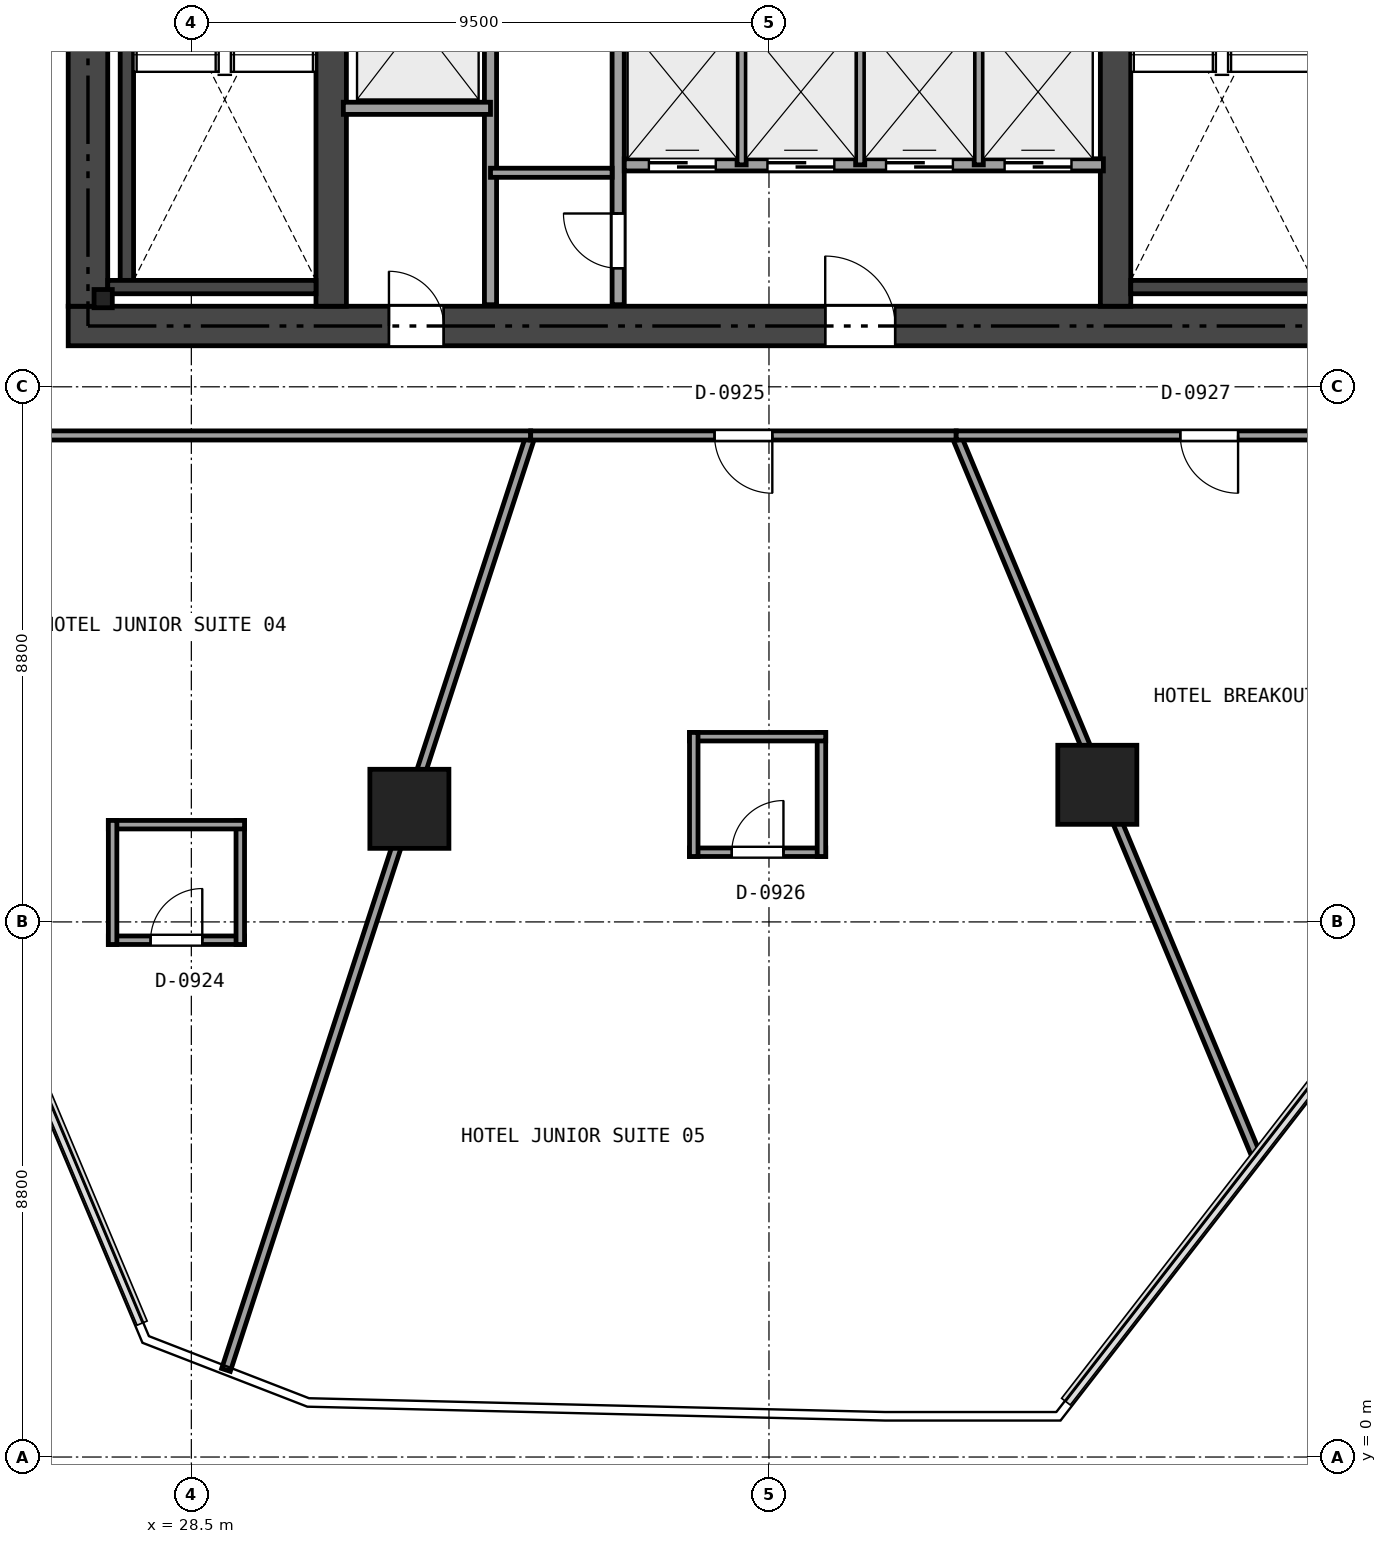
"""IFC4 building model, lengths in metres.
Left out: names, types, materials, properties, quantities, classifications, styles, units other than length and angle.
Written with IfcOpenShell. Run it as: python <this file> out.ifc"""

import sys

from ifc_helpers import new_model, si_unit, direction, frame, frame_2d, origin, origin_2d, place, context, subcontext, project, spatial, rectangle, i_section, extrude, element, fill, save


model = new_model("IFC4")
c1 = context("Model", 3, precision=1e-05, world=origin(), true_north=direction((0.0, 1.0)))
c2 = subcontext(c1, "Body", "Model", "MODEL_VIEW")
j1 = project(units=[si_unit("LENGTHUNIT", "METRE"), si_unit("PLANEANGLEUNIT", "RADIAN")], contexts=[c1])
p1 = place(None, origin())
s1 = spatial("IfcSite", under=j1, at=p1, CompositionType="ELEMENT")
p2 = place(p1, origin())
s2 = spatial("IfcBuilding", under=s1, at=p2, CompositionType="ELEMENT")
p3 = place(p2, frame((0.0, 0.0, 40.8)))
s3 = spatial("IfcBuildingStorey", under=s2, at=p3, CompositionType="ELEMENT", Elevation=40.8)
p4 = place(p3, frame((26.475, 18.6, 0.0), z_axis=(0.0, 0.0, 1.0), x_axis=(1.0, 0.0, 0.0)))
e1 = element("IfcWall", 1, at=p4, inside=s3, PredefinedType="SHEAR", context=c2, shape_type="SweptSolid", body=[
    extrude(rectangle(XDim=21.45, YDim=0.65, at=frame_2d((10.725, 0.0))), origin(), (0.0, 0.0, 1.0), 3.17),
])
p5 = place(p4, frame((12.45, 0.0, 0.0)))
e2 = element("IfcOpeningElement", 2, at=p5, cuts=e1, PredefinedType="OPENING", context=c2, shape_type="SweptSolid", body=[
    extrude(rectangle(XDim=1.15, YDim=2.15, at=frame_2d((0.575, 1.075))), frame((0.0, 0.335, 0.0), z_axis=(0.0, -1.0, 0.0), x_axis=(1.0, 0.0, 0.0)), (0.0, 0.0, 1.0), 0.67),
])
p6 = place(p4, frame((5.275, 0.0, 0.0)))
e3 = element("IfcOpeningElement", 3, at=p6, cuts=e1, PredefinedType="OPENING", context=c2, shape_type="SweptSolid", body=[
    extrude(rectangle(XDim=0.9, YDim=2.1, at=frame_2d((0.45, 1.05))), frame((0.0, 0.335, 0.0), z_axis=(0.0, -1.0, 0.0), x_axis=(1.0, 0.0, 0.0)), (0.0, 0.0, 1.0), 0.67),
])
p7 = place(p3, frame((26.8, 18.925, 0.0), z_axis=(0.0, 0.0, 1.0), x_axis=(0.0, 1.0, 0.0)))
e4 = element("IfcWall", 4, at=p7, inside=s3, PredefinedType="SHEAR", context=c2, shape_type="SweptSolid", body=[
    extrude(rectangle(XDim=14.95, YDim=0.65, at=frame_2d((7.475, 0.0))), origin(), (0.0, 0.0, 1.0), 3.17),
])
p8 = place(p3, frame((30.8, 18.925, 0.0), z_axis=(0.0, 0.0, 1.0), x_axis=(0.0, 1.0, 0.0)))
e5 = element("IfcWall", 5, at=p8, inside=s3, PredefinedType="SHEAR", context=c2, shape_type="SweptSolid", body=[
    extrude(rectangle(XDim=14.95, YDim=0.5, at=frame_2d((7.475, 0.0))), origin(), (0.0, 0.0, 1.0), 3.17),
])
p9 = place(p8, frame((6.575, 0.0, 0.0)))
e6 = element("IfcOpeningElement", 6, at=p9, cuts=e5, PredefinedType="OPENING", context=c2, shape_type="SweptSolid", body=[
    extrude(rectangle(XDim=1.1, YDim=2.15, at=frame_2d((0.55, 1.075))), frame((0.0, 0.26, 0.0), z_axis=(0.0, -1.0, 0.0), x_axis=(1.0, 0.0, 0.0)), (0.0, 0.0, 1.0), 0.52),
])
p10 = place(p8, frame((8.375, 0.0, 0.0)))
e7 = element("IfcOpeningElement", 7, at=p10, cuts=e5, PredefinedType="OPENING", context=c2, shape_type="SweptSolid", body=[
    extrude(rectangle(XDim=0.9, YDim=2.1, at=frame_2d((0.45, 1.05))), frame((0.0, 0.26, 0.0), z_axis=(0.0, -1.0, 0.0), x_axis=(1.0, 0.0, 0.0)), (0.0, 0.0, 1.0), 0.52),
])
p11 = place(p3, frame((43.7, 18.925, 0.0), z_axis=(0.0, 0.0, 1.0), x_axis=(0.0, 1.0, 0.0)))
e8 = element("IfcWall", 8, at=p11, inside=s3, PredefinedType="SHEAR", context=c2, shape_type="SweptSolid", body=[
    extrude(rectangle(XDim=14.95, YDim=0.5, at=frame_2d((7.475, 0.0))), origin(), (0.0, 0.0, 1.0), 3.17),
])
p12 = place(p11, frame((8.075, 0.0, 0.0)))
e9 = element("IfcOpeningElement", 9, at=p12, cuts=e8, PredefinedType="OPENING", context=c2, shape_type="SweptSolid", body=[
    extrude(rectangle(XDim=0.9, YDim=2.1, at=frame_2d((0.45, 1.05))), frame((0.0, 0.26, 0.0), z_axis=(0.0, -1.0, 0.0), x_axis=(1.0, 0.0, 0.0)), (0.0, 0.0, 1.0), 0.52),
])
p13 = place(p3, frame((27.44, 19.35, 0.0), z_axis=(0.0, 0.0, 1.0), x_axis=(0.0, 1.0, 0.0)))
e10 = element("IfcWall", 10, at=p13, inside=s3, PredefinedType="SHEAR", context=c2, shape_type="SweptSolid", body=[
    extrude(rectangle(XDim=7.4, YDim=0.22, at=frame_2d((3.7, 0.0))), origin(), (0.0, 0.0, 1.0), 3.17),
])
p14 = place(p3, frame((27.125, 19.24, 0.0), z_axis=(0.0, 0.0, 1.0), x_axis=(1.0, 0.0, 0.0)))
e11 = element("IfcWall", 11, at=p14, inside=s3, PredefinedType="SHEAR", context=c2, shape_type="SweptSolid", body=[
    extrude(rectangle(XDim=3.425, YDim=0.22, at=frame_2d((1.712, 0.0))), origin(), (0.0, 0.0, 1.0), 3.17),
])
p15 = place(p3, frame((43.95, 19.24, 0.0), z_axis=(0.0, 0.0, 1.0), x_axis=(1.0, 0.0, 0.0)))
e12 = element("IfcWall", 12, at=p15, inside=s3, PredefinedType="SHEAR", context=c2, shape_type="SweptSolid", body=[
    extrude(rectangle(XDim=3.325, YDim=0.22, at=frame_2d((1.663, 0.0))), origin(), (0.0, 0.0, 1.0), 3.17),
])
for number, where, z_axis, x_axis in (
    (13, (32.086, 10.66, 0.0), (0.0, 0.0, 1.0), (1.0, 0.0, 0.0)),
    (14, (43.4, 11.055, 0.0), (0.0, 0.0, 1.0), (1.0, 0.0, 0.0)),
):
    element("IfcColumn", number, at=place(p3, frame(where, z_axis=z_axis, x_axis=x_axis)), inside=s3, PredefinedType="COLUMN", context=c2, shape_type="SweptSolid", body=[
        extrude(rectangle(XDim=1.3, YDim=1.3, at=origin_2d()), origin(), (0.0, 0.0, 1.0), 3.17),
    ])
p16 = place(p3, frame((27.05, 19.05, 0.0), z_axis=(0.0, 0.0, 1.0), x_axis=(1.0, 0.0, 0.0)))
e15 = element("IfcColumn", 15, at=p16, inside=s3, PredefinedType="PILASTER", context=c2, shape_type="SweptSolid", body=[
    extrude(i_section(OverallWidth=0.3, OverallDepth=0.3, WebThickness=0.011, FlangeThickness=0.019, at=origin_2d()), origin(), (0.0, 0.0, 1.0), 3.17),
])
p17 = place(p3, frame((35.52, 18.95, 0.0), z_axis=(0.0, 0.0, 1.0), x_axis=(0.0, 1.0, 0.0)))
e16 = element("IfcWall", 16, at=p17, inside=s3, PredefinedType="SOLIDWALL", context=c2, shape_type="SweptSolid", body=[
    extrude(rectangle(XDim=14.9, YDim=0.2, at=frame_2d((7.45, 0.0))), origin(), (0.0, 0.0, 1.0), 2.691),
])
p18 = place(p17, frame((7.755, 0.0, 0.0)))
e17 = element("IfcOpeningElement", 17, at=p18, cuts=e16, PredefinedType="OPENING", context=c2, shape_type="SweptSolid", body=[
    extrude(rectangle(XDim=0.95, YDim=2.15, at=frame_2d((0.475, 1.075))), frame((0.0, 0.11, 0.0), z_axis=(0.0, -1.0, 0.0), x_axis=(1.0, 0.0, 0.0)), (0.0, 0.0, 1.0), 0.22),
])
p19 = place(p17, frame((0.6, 0.0, 0.0)))
e18 = element("IfcOpeningElement", 18, at=p19, cuts=e16, PredefinedType="OPENING", context=c2, shape_type="SweptSolid", body=[
    extrude(rectangle(XDim=0.9, YDim=2.1, at=frame_2d((0.45, 1.05))), frame((0.0, 0.11, 0.0), z_axis=(0.0, -1.0, 0.0), x_axis=(1.0, 0.0, 0.0)), (0.0, 0.0, 1.0), 0.22),
])
p20 = place(p3, frame((33.42, 18.95, 0.0), z_axis=(0.0, 0.0, 1.0), x_axis=(0.0, 1.0, 0.0)))
e19 = element("IfcWall", 19, at=p20, inside=s3, PredefinedType="SOLIDWALL", context=c2, shape_type="SweptSolid", body=[
    extrude(rectangle(XDim=6.13, YDim=0.2, at=frame_2d((3.065, 0.0))), origin(), (0.0, 0.0, 1.0), 2.691),
])
p21 = place(p3, frame((31.0, 22.18, 0.0), z_axis=(0.0, 0.0, 1.0), x_axis=(1.0, 0.0, 0.0)))
e20 = element("IfcWall", 20, at=p21, inside=s3, PredefinedType="SOLIDWALL", context=c2, shape_type="SweptSolid", body=[
    extrude(rectangle(XDim=2.42, YDim=0.2, at=frame_2d((1.21, 0.0))), origin(), (0.0, 0.0, 1.0), 3.17),
])
p22 = place(p3, frame((33.42, 21.12, 0.0), z_axis=(0.0, 0.0, 1.0), x_axis=(1.0, 0.0, 0.0)))
e21 = element("IfcWall", 21, at=p22, inside=s3, PredefinedType="PARTITIONING", context=c2, shape_type="SweptSolid", body=[
    extrude(rectangle(XDim=2.0, YDim=0.15, at=frame_2d((1.0, 0.0))), origin(), (0.0, 0.0, 1.0), 3.17),
])
p23 = place(p3, frame((35.62, 21.25, 0.0), z_axis=(0.0, 0.0, 1.0), x_axis=(1.0, 0.0, 0.0)))
e22 = element("IfcWall", 22, at=p23, inside=s3, PredefinedType="SOLIDWALL", context=c2, shape_type="SweptSolid", body=[
    extrude(rectangle(XDim=7.88, YDim=0.2, at=frame_2d((3.94, 0.0))), origin(), (0.0, 0.0, 1.0), 3.17),
])
p24 = place(p23, frame((0.405, 0.0, 0.0)))
e23 = element("IfcOpeningElement", 23, at=p24, cuts=e22, PredefinedType="OPENING", context=c2, shape_type="SweptSolid", body=[
    extrude(rectangle(XDim=1.1, YDim=2.15, at=frame_2d((0.55, 1.075))), frame((0.0, 0.11, 0.0), z_axis=(0.0, -1.0, 0.0), x_axis=(1.0, 0.0, 0.0)), (0.0, 0.0, 1.0), 0.22),
])
p25 = place(p23, frame((2.355, 0.0, 0.0)))
e24 = element("IfcOpeningElement", 24, at=p25, cuts=e22, PredefinedType="OPENING", context=c2, shape_type="SweptSolid", body=[
    extrude(rectangle(XDim=1.1, YDim=2.15, at=frame_2d((0.55, 1.075))), frame((0.0, 0.11, 0.0), z_axis=(0.0, -1.0, 0.0), x_axis=(1.0, 0.0, 0.0)), (0.0, 0.0, 1.0), 0.22),
])
p26 = place(p23, frame((4.305, 0.0, 0.0)))
e25 = element("IfcOpeningElement", 25, at=p26, cuts=e22, PredefinedType="OPENING", context=c2, shape_type="SweptSolid", body=[
    extrude(rectangle(XDim=1.1, YDim=2.15, at=frame_2d((0.55, 1.075))), frame((0.0, 0.11, 0.0), z_axis=(0.0, -1.0, 0.0), x_axis=(1.0, 0.0, 0.0)), (0.0, 0.0, 1.0), 0.22),
])
p27 = place(p23, frame((6.255, 0.0, 0.0)))
e26 = element("IfcOpeningElement", 26, at=p27, cuts=e22, PredefinedType="OPENING", context=c2, shape_type="SweptSolid", body=[
    extrude(rectangle(XDim=1.1, YDim=2.15, at=frame_2d((0.55, 1.075))), frame((0.0, 0.11, 0.0), z_axis=(0.0, -1.0, 0.0), x_axis=(1.0, 0.0, 0.0)), (0.0, 0.0, 1.0), 0.22),
])
for number, where, z_axis, x_axis in (
    (27, (37.55, 21.25, 0.0), (0.0, 0.0, 1.0), (0.0, 1.0, 0.0)),
    (28, (39.5, 21.25, 0.0), (0.0, 0.0, 1.0), (0.0, 1.0, 0.0)),
    (29, (41.45, 21.25, 0.0), (0.0, 0.0, 1.0), (0.0, 1.0, 0.0)),
):
    element("IfcWall", number, at=place(p3, frame(where, z_axis=z_axis, x_axis=x_axis)), inside=s3, PredefinedType="PARTITIONING", context=c2, shape_type="SweptSolid", body=[
        extrude(rectangle(XDim=2.4, YDim=0.15, at=frame_2d((1.2, 0.0))), origin(), (0.0, 0.0, 1.0), 2.691),
    ])
p28 = place(p3, frame((27.135, 8.499, 0.0), z_axis=(0.0, 0.0, 1.0), x_axis=(1.0, 0.0, 0.0)))
e30 = element("IfcWall", 30, at=p28, inside=s3, PredefinedType="PARTITIONING", context=c2, shape_type="SweptSolid", body=[
    extrude(rectangle(XDim=2.24, YDim=0.14, at=frame_2d((1.12, 0.0))), origin(), (0.0, 0.0, 1.0), 3.17),
])
p29 = place(p28, frame((0.695, 0.0, 0.0)))
e31 = element("IfcOpeningElement", 31, at=p29, cuts=e30, PredefinedType="OPENING", context=c2, shape_type="SweptSolid", body=[
    extrude(rectangle(XDim=0.85, YDim=2.1, at=frame_2d((0.425, 1.05))), frame((0.0, 0.08, 0.0), z_axis=(0.0, -1.0, 0.0), x_axis=(1.0, 0.0, 0.0)), (0.0, 0.0, 1.0), 0.16),
])
p30 = place(p3, frame((29.305, 8.429, 0.0), z_axis=(0.0, 0.0, 1.0), x_axis=(0.0, 1.0, 0.0)))
e32 = element("IfcWall", 32, at=p30, inside=s3, PredefinedType="PARTITIONING", context=c2, shape_type="SweptSolid", body=[
    extrude(rectangle(XDim=2.04, YDim=0.14, at=frame_2d((1.02, 0.0))), origin(), (0.0, 0.0, 1.0), 3.17),
])
p31 = place(p3, frame((29.375, 10.399, 0.0), z_axis=(0.0, 0.0, 1.0), x_axis=(-1.0, 0.0, 0.0)))
e33 = element("IfcWall", 33, at=p31, inside=s3, PredefinedType="PARTITIONING", context=c2, shape_type="SweptSolid", body=[
    extrude(rectangle(XDim=2.24, YDim=0.14, at=frame_2d((1.12, 0.0))), origin(), (0.0, 0.0, 1.0), 3.17),
])
p32 = place(p3, frame((27.205, 10.469, 0.0), z_axis=(0.0, 0.0, 1.0), x_axis=(0.0, -1.0, 0.0)))
e34 = element("IfcWall", 34, at=p32, inside=s3, PredefinedType="PARTITIONING", context=c2, shape_type="SweptSolid", body=[
    extrude(rectangle(XDim=2.04, YDim=0.14, at=frame_2d((1.02, 0.0))), origin(), (0.0, 0.0, 1.0), 3.17),
])
p33 = place(p3, frame((36.693, 9.946, 0.0), z_axis=(0.0, 0.0, 1.0), x_axis=(1.0, 0.0, 0.0)))
e35 = element("IfcWall", 35, at=p33, inside=s3, PredefinedType="PARTITIONING", context=c2, shape_type="SweptSolid", body=[
    extrude(rectangle(XDim=2.24, YDim=0.14, at=frame_2d((1.12, 0.0))), origin(), (0.0, 0.0, 1.0), 3.17),
])
p34 = place(p33, frame((0.695, 0.0, 0.0)))
e36 = element("IfcOpeningElement", 36, at=p34, cuts=e35, PredefinedType="OPENING", context=c2, shape_type="SweptSolid", body=[
    extrude(rectangle(XDim=0.85, YDim=2.1, at=frame_2d((0.425, 1.05))), frame((0.0, 0.08, 0.0), z_axis=(0.0, -1.0, 0.0), x_axis=(1.0, 0.0, 0.0)), (0.0, 0.0, 1.0), 0.16),
])
p35 = place(p3, frame((38.863, 9.876, 0.0), z_axis=(0.0, 0.0, 1.0), x_axis=(0.0, 1.0, 0.0)))
e37 = element("IfcWall", 37, at=p35, inside=s3, PredefinedType="PARTITIONING", context=c2, shape_type="SweptSolid", body=[
    extrude(rectangle(XDim=2.04, YDim=0.14, at=frame_2d((1.02, 0.0))), origin(), (0.0, 0.0, 1.0), 2.355),
])
p36 = place(p3, frame((38.933, 11.846, 0.0), z_axis=(0.0, 0.0, 1.0), x_axis=(-1.0, 0.0, 0.0)))
e38 = element("IfcWall", 38, at=p36, inside=s3, PredefinedType="PARTITIONING", context=c2, shape_type="SweptSolid", body=[
    extrude(rectangle(XDim=2.24, YDim=0.14, at=frame_2d((1.12, 0.0))), origin(), (0.0, 0.0, 1.0), 3.17),
])
p37 = place(p3, frame((36.763, 11.916, 0.0), z_axis=(0.0, 0.0, 1.0), x_axis=(0.0, -1.0, 0.0)))
e39 = element("IfcWall", 39, at=p37, inside=s3, PredefinedType="PARTITIONING", context=c2, shape_type="SweptSolid", body=[
    extrude(rectangle(XDim=2.04, YDim=0.14, at=frame_2d((1.02, 0.0))), origin(), (0.0, 0.0, 1.0), 2.355),
])
p38 = place(p3, frame((29.07, 1.432, 0.0), z_axis=(0.0, 0.0, 1.0), x_axis=(0.309999825154, 0.950736613582, 0.0)))
e40 = element("IfcWall", 40, at=p38, inside=s3, PredefinedType="PARTITIONING", context=c2, shape_type="SweptSolid", body=[
    extrude(rectangle(XDim=16.165, YDim=0.15, at=frame_2d((8.082, 0.0))), origin(), (0.0, 0.0, 1.0), 2.395),
])
p39 = place(p3, frame((34.081, 16.8, 0.0), z_axis=(0.0, 0.0, 1.0), x_axis=(-1.0, 0.0, 0.0)))
e41 = element("IfcWall", 41, at=p39, inside=s3, PredefinedType="PARTITIONING", context=c2, shape_type="SweptSolid", body=[
    extrude(rectangle(XDim=9.081, YDim=0.15, at=frame_2d((4.541, 0.0))), origin(), (0.0, 0.0, 1.0), 2.355),
])
p40 = place(p3, frame((46.04, 4.895, 0.0), z_axis=(0.0, 0.0, 1.0), x_axis=(-0.384648987158, 0.9230629213, 0.0)))
e42 = element("IfcWall", 42, at=p40, inside=s3, PredefinedType="PARTITIONING", context=c2, shape_type="SweptSolid", body=[
    extrude(rectangle(XDim=12.897, YDim=0.15, at=frame_2d((6.449, 0.0))), origin(), (0.0, 0.0, 1.0), 2.395),
])
p41 = place(p3, frame((41.079, 16.8, 0.0), z_axis=(0.0, 0.0, 1.0), x_axis=(-1.0, 0.0, 0.0)))
e43 = element("IfcWall", 43, at=p41, inside=s3, PredefinedType="PARTITIONING", context=c2, shape_type="SweptSolid", body=[
    extrude(rectangle(XDim=6.998, YDim=0.15, at=frame_2d((3.499, 0.0))), origin(), (0.0, 0.0, 1.0), 2.395),
])
p42 = place(p41, frame((3.024, 0.0, 0.0)))
e44 = element("IfcOpeningElement", 44, at=p42, cuts=e43, PredefinedType="OPENING", context=c2, shape_type="SweptSolid", body=[
    extrude(rectangle(XDim=0.95, YDim=2.15, at=frame_2d((0.475, 1.075))), frame((0.0, 0.085, 0.0), z_axis=(0.0, -1.0, 0.0), x_axis=(1.0, 0.0, 0.0)), (0.0, 0.0, 1.0), 0.17),
])
p43 = place(p3, frame((49.4, 16.8, 0.0), z_axis=(0.0, 0.0, 1.0), x_axis=(-1.0, 0.0, 0.0)))
e45 = element("IfcWall", 45, at=p43, inside=s3, PredefinedType="PARTITIONING", context=c2, shape_type="SweptSolid", body=[
    extrude(rectangle(XDim=8.321, YDim=0.15, at=frame_2d((4.16, 0.0))), origin(), (0.0, 0.0, 1.0), 2.355),
])
p44 = place(p43, frame((3.685, 0.0, 0.0)))
e46 = element("IfcOpeningElement", 46, at=p44, cuts=e45, PredefinedType="OPENING", context=c2, shape_type="SweptSolid", body=[
    extrude(rectangle(XDim=0.95, YDim=2.15, at=frame_2d((0.475, 1.075))), frame((0.0, 0.085, 0.0), z_axis=(0.0, -1.0, 0.0), x_axis=(1.0, 0.0, 0.0)), (0.0, 0.0, 1.0), 0.17),
])
p45 = place(p5, origin())
e47 = element("IfcDoor", 47, at=p45, inside=s3, OperationType="SINGLE_SWING_LEFT", PredefinedType="DOOR", context=c2, shape_type="SweptSolid", body=[
    extrude(rectangle(XDim=1.15, YDim=2.15, at=frame_2d((0.575, 1.075))), frame((0.0, 0.025, 0.0), z_axis=(0.0, -1.0, 0.0), x_axis=(1.0, 0.0, 0.0)), (0.0, 0.0, 1.0), 0.05),
])
fill(e2, e47)
p46 = place(p6, origin())
e48 = element("IfcDoor", 48, at=p46, inside=s3, OperationType="SINGLE_SWING_LEFT", PredefinedType="DOOR", context=c2, shape_type="SweptSolid", body=[
    extrude(rectangle(XDim=0.9, YDim=2.1, at=frame_2d((0.45, 1.05))), frame((0.0, 0.025, 0.0), z_axis=(0.0, -1.0, 0.0), x_axis=(1.0, 0.0, 0.0)), (0.0, 0.0, 1.0), 0.05),
])
fill(e3, e48)
p47 = place(p19, origin())
e49 = element("IfcDoor", 49, at=p47, inside=s3, OperationType="SINGLE_SWING_RIGHT", PredefinedType="DOOR", context=c2, shape_type="SweptSolid", body=[
    extrude(rectangle(XDim=0.9, YDim=2.1, at=frame_2d((0.45, 1.05))), frame((0.0, 0.025, 0.0), z_axis=(0.0, -1.0, 0.0), x_axis=(1.0, 0.0, 0.0)), (0.0, 0.0, 1.0), 0.05),
])
fill(e18, e49)
p48 = place(p24, origin())
e50 = element("IfcDoor", 50, at=p48, inside=s3, OperationType="SLIDING_TO_LEFT", PredefinedType="DOOR", context=c2, shape_type="SweptSolid", body=[
    extrude(rectangle(XDim=1.1, YDim=2.15, at=frame_2d((0.55, 1.075))), frame((0.0, 0.025, 0.0), z_axis=(0.0, -1.0, 0.0), x_axis=(1.0, 0.0, 0.0)), (0.0, 0.0, 1.0), 0.05),
])
fill(e23, e50)
p49 = place(p25, origin())
e51 = element("IfcDoor", 51, at=p49, inside=s3, OperationType="SLIDING_TO_LEFT", PredefinedType="DOOR", context=c2, shape_type="SweptSolid", body=[
    extrude(rectangle(XDim=1.1, YDim=2.15, at=frame_2d((0.55, 1.075))), frame((0.0, 0.025, 0.0), z_axis=(0.0, -1.0, 0.0), x_axis=(1.0, 0.0, 0.0)), (0.0, 0.0, 1.0), 0.05),
])
fill(e24, e51)
p50 = place(p26, origin())
e52 = element("IfcDoor", 52, at=p50, inside=s3, OperationType="SLIDING_TO_LEFT", PredefinedType="DOOR", context=c2, shape_type="SweptSolid", body=[
    extrude(rectangle(XDim=1.1, YDim=2.15, at=frame_2d((0.55, 1.075))), frame((0.0, 0.025, 0.0), z_axis=(0.0, -1.0, 0.0), x_axis=(1.0, 0.0, 0.0)), (0.0, 0.0, 1.0), 0.05),
])
fill(e25, e52)
p51 = place(p27, origin())
e53 = element("IfcDoor", 53, at=p51, inside=s3, OperationType="SLIDING_TO_LEFT", PredefinedType="DOOR", context=c2, shape_type="SweptSolid", body=[
    extrude(rectangle(XDim=1.1, YDim=2.15, at=frame_2d((0.55, 1.075))), frame((0.0, 0.025, 0.0), z_axis=(0.0, -1.0, 0.0), x_axis=(1.0, 0.0, 0.0)), (0.0, 0.0, 1.0), 0.05),
])
fill(e26, e53)
p52 = place(p29, origin())
e54 = element("IfcDoor", 54, at=p52, inside=s3, OperationType="SINGLE_SWING_RIGHT", PredefinedType="DOOR", context=c2, shape_type="SweptSolid", body=[
    extrude(rectangle(XDim=0.85, YDim=2.1, at=frame_2d((0.425, 1.05))), frame((0.0, 0.025, 0.0), z_axis=(0.0, -1.0, 0.0), x_axis=(1.0, 0.0, 0.0)), (0.0, 0.0, 1.0), 0.05),
])
fill(e31, e54)
p53 = place(p42, origin())
e55 = element("IfcDoor", 55, at=p53, inside=s3, OperationType="SINGLE_SWING_LEFT", PredefinedType="DOOR", context=c2, shape_type="SweptSolid", body=[
    extrude(rectangle(XDim=0.95, YDim=2.15, at=frame_2d((0.475, 1.075))), frame((0.0, 0.025, 0.0), z_axis=(0.0, -1.0, 0.0), x_axis=(1.0, 0.0, 0.0)), (0.0, 0.0, 1.0), 0.05),
])
fill(e44, e55)
p54 = place(p34, origin())
e56 = element("IfcDoor", 56, at=p54, inside=s3, OperationType="SINGLE_SWING_RIGHT", PredefinedType="DOOR", context=c2, shape_type="SweptSolid", body=[
    extrude(rectangle(XDim=0.85, YDim=2.1, at=frame_2d((0.425, 1.05))), frame((0.0, 0.025, 0.0), z_axis=(0.0, -1.0, 0.0), x_axis=(1.0, 0.0, 0.0)), (0.0, 0.0, 1.0), 0.05),
])
fill(e36, e56)
p55 = place(p44, origin())
e57 = element("IfcDoor", 57, at=p55, inside=s3, OperationType="SINGLE_SWING_LEFT", PredefinedType="DOOR", context=c2, shape_type="SweptSolid", body=[
    extrude(rectangle(XDim=0.95, YDim=2.15, at=frame_2d((0.475, 1.075))), frame((0.0, 0.025, 0.0), z_axis=(0.0, -1.0, 0.0), x_axis=(1.0, 0.0, 0.0)), (0.0, 0.0, 1.0), 0.05),
])
fill(e46, e57)
save(model, sys.argv[1])
